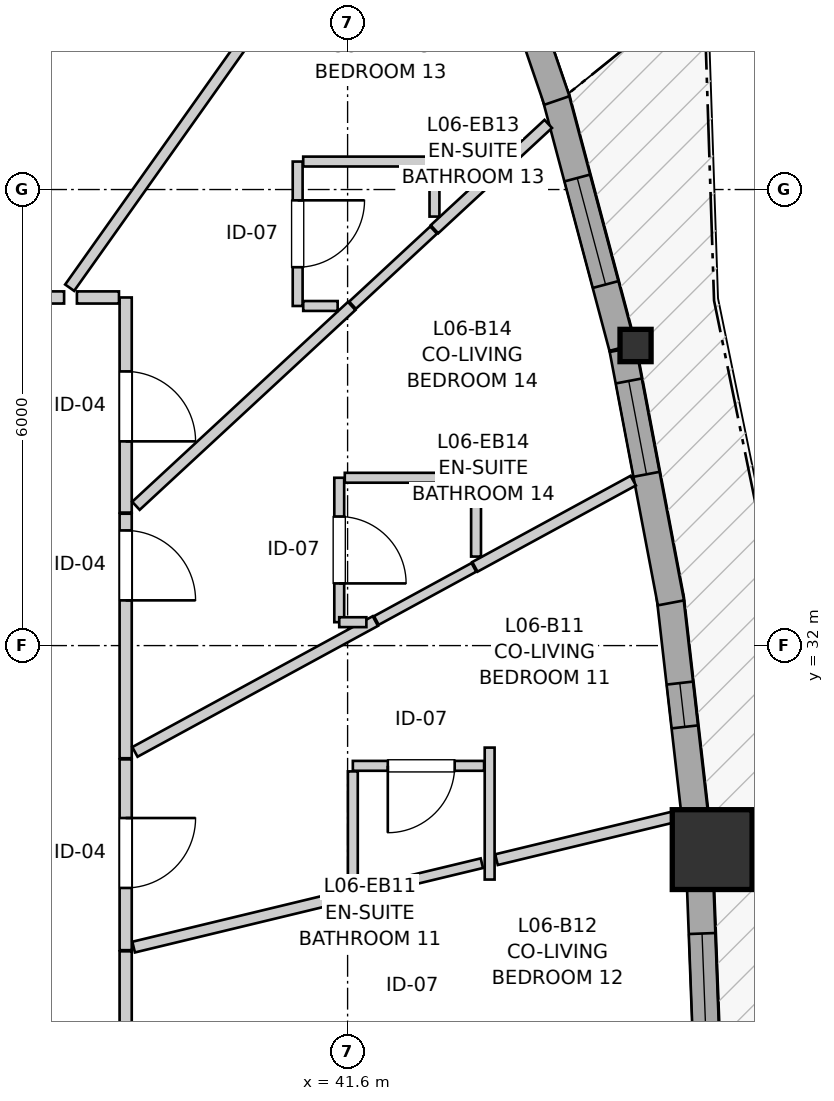
"""IFC4 building model, lengths in metres.
Left out: names, types, materials, properties, quantities, classifications, styles, units other than length and angle.
Written with IfcOpenShell. Run it as: python <this file> out.ifc"""

import sys

from ifc_helpers import new_model, si_unit, direction, frame, frame_2d, origin, origin_2d, place, context, subcontext, project, spatial, rectangle, i_section, extrude, source, transform, mapped, element, fill, save


model = new_model("IFC4")
c1 = context("Model", 3, precision=1e-05, world=origin(), true_north=direction((0.0, 1.0)))
c2 = subcontext(c1, "Body", "Model", "MODEL_VIEW")
j1 = project(units=[si_unit("LENGTHUNIT", "METRE"), si_unit("PLANEANGLEUNIT", "RADIAN")], contexts=[c1])
p1 = place(None, origin())
s1 = spatial("IfcSite", under=j1, at=p1, CompositionType="ELEMENT")
p2 = place(p1, origin())
s2 = spatial("IfcBuilding", under=s1, at=p2, CompositionType="ELEMENT")
p3 = place(p2, frame((0.0, 0.0, 23.8)))
s3 = spatial("IfcBuildingStorey", under=s2, at=p3, CompositionType="ELEMENT", Elevation=23.8)
m1 = source(origin(), c2, "Body", "SweptSolid", [
    extrude(rectangle(XDim=1.05, YDim=1.05, at=origin_2d()), origin(), (0.0, 0.0, 1.0), 2.935),
])
p4 = place(p3, frame((46.397, 29.316, 0.0), z_axis=(0.0, 0.0, 1.0), x_axis=(1.0, 0.0, 0.0)))
e1 = element("IfcColumn", 1, at=p4, inside=s3, PredefinedType="COLUMN", context=c2, shape_type="MappedRepresentation", body=[
    mapped(m1, transform((0.0, 0.0, 0.0), x_axis=(1.0, 0.0, 0.0), y_axis=(0.0, 1.0, 0.0), z_axis=(0.0, 0.0, 1.0), scale=1.0)),
])
m2 = source(origin(), c2, "Body", "SweptSolid", [
    extrude(i_section(OverallWidth=0.409, OverallDepth=0.425, WebThickness=0.03, FlangeThickness=0.048, FilletRadius=0.015, at=origin_2d()), origin(), (0.0, 0.0, 1.0), 2.935),
])
p5 = place(p3, frame((45.389, 35.948, 0.0), z_axis=(0.0, 0.0, 1.0), x_axis=(1.0, 0.0, 0.0)))
e2 = element("IfcColumn", 2, at=p5, inside=s3, PredefinedType="PILASTER", context=c2, shape_type="MappedRepresentation", body=[
    mapped(m2, transform((0.0, 0.0, 0.0), x_axis=(1.0, 0.0, 0.0), y_axis=(0.0, 1.0, 0.0), z_axis=(0.0, 0.0, 1.0), scale=1.0)),
])
p6 = place(p3, frame((46.349, 25.955, 0.0), z_axis=(0.0, 0.0, 1.0), x_axis=(-0.038022046735, 0.999276900545, 0.0)))
e3 = element("IfcWall", 3, at=p6, inside=s3, PredefinedType="SOLIDWALL", context=c2, shape_type="SweptSolid", body=[
    extrude(rectangle(XDim=3.056, YDim=0.35, at=frame_2d((1.528, 0.0))), origin(), (0.0, 0.0, 1.0), 2.415),
])
p7 = place(p6, frame((0.808, 0.0, 0.82)))
e4 = element("IfcOpeningElement", 4, at=p7, cuts=e3, PredefinedType="OPENING", context=c2, shape_type="SweptSolid", body=[
    extrude(rectangle(XDim=1.45, YDim=1.25, at=frame_2d((0.725, 0.625))), frame((0.0, 0.185, 0.0), z_axis=(0.0, -1.0, 0.0), x_axis=(1.0, 0.0, 0.0)), (0.0, 0.0, 1.0), 0.37),
])
p8 = place(p3, frame((46.189, 29.594, 0.0), z_axis=(0.0, 0.0, 1.0), x_axis=(-0.113201797404, 0.99357201705, 0.0)))
e5 = element("IfcWall", 5, at=p8, inside=s3, PredefinedType="SOLIDWALL", context=c2, shape_type="SweptSolid", body=[
    extrude(rectangle(XDim=3.075, YDim=0.35, at=frame_2d((1.538, 0.0))), origin(), (0.0, 0.0, 1.0), 2.415),
])
p9 = place(p8, frame((1.345, 0.0, 0.82)))
e6 = element("IfcOpeningElement", 6, at=p9, cuts=e5, PredefinedType="OPENING", context=c2, shape_type="SweptSolid", body=[
    extrude(rectangle(XDim=0.58, YDim=1.35, at=frame_2d((0.29, 0.675))), frame((0.0, 0.185, 0.0), z_axis=(0.0, -1.0, 0.0), x_axis=(1.0, 0.0, 0.0)), (0.0, 0.0, 1.0), 0.37),
])
p10 = place(p3, frame((45.854, 32.562, 0.0), z_axis=(0.0, 0.0, 1.0), x_axis=(-0.186698837055, 0.982417194598, 0.0)))
e7 = element("IfcWall", 7, at=p10, inside=s3, PredefinedType="SOLIDWALL", context=c2, shape_type="SweptSolid", body=[
    extrude(rectangle(XDim=3.393, YDim=0.35, at=frame_2d((1.697, 0.0))), origin(), (0.0, 0.0, 1.0), 2.415),
])
p11 = place(p10, frame((1.721, 0.0, 0.82)))
e8 = element("IfcOpeningElement", 8, at=p11, cuts=e7, PredefinedType="OPENING", context=c2, shape_type="SweptSolid", body=[
    extrude(rectangle(XDim=1.25, YDim=1.35, at=frame_2d((0.625, 0.675))), frame((0.0, 0.185, 0.0), z_axis=(0.0, -1.0, 0.0), x_axis=(1.0, 0.0, 0.0)), (0.0, 0.0, 1.0), 0.37),
])
p12 = place(p3, frame((45.214, 35.922, 0.0), z_axis=(0.0, 0.0, 1.0), x_axis=(-0.257081073508, 0.966389839373, 0.0)))
e9 = element("IfcWall", 9, at=p12, inside=s3, PredefinedType="SOLIDWALL", context=c2, shape_type="SweptSolid", body=[
    extrude(rectangle(XDim=3.449, YDim=0.35, at=frame_2d((1.725, 0.0))), origin(), (0.0, 0.0, 1.0), 2.415),
])
p13 = place(p12, frame((0.857, 0.0, 0.82)))
e10 = element("IfcOpeningElement", 10, at=p13, cuts=e9, PredefinedType="OPENING", context=c2, shape_type="SweptSolid", body=[
    extrude(rectangle(XDim=1.45, YDim=1.25, at=frame_2d((0.725, 0.625))), frame((0.0, 0.185, 0.0), z_axis=(0.0, -1.0, 0.0), x_axis=(1.0, 0.0, 0.0)), (0.0, 0.0, 1.0), 0.37),
])
p14 = place(p3, frame((44.353, 39.171, 0.0), z_axis=(0.0, 0.0, 1.0), x_axis=(-0.323604310653, 0.946192501623, 0.0)))
e11 = element("IfcWall", 11, at=p14, inside=s3, PredefinedType="SOLIDWALL", context=c2, shape_type="SweptSolid", body=[
    extrude(rectangle(XDim=3.243, YDim=0.35, at=frame_2d((1.621, 0.0))), origin(), (0.0, 0.0, 1.0), 2.415),
])
p15 = place(p14, frame((0.901, 0.0, 0.82)))
e12 = element("IfcOpeningElement", 12, at=p15, cuts=e11, PredefinedType="OPENING", context=c2, shape_type="SweptSolid", body=[
    extrude(rectangle(XDim=1.45, YDim=1.25, at=frame_2d((0.725, 0.625))), frame((0.0, 0.185, 0.0), z_axis=(0.0, -1.0, 0.0), x_axis=(1.0, 0.0, 0.0)), (0.0, 0.0, 1.0), 0.37),
])
p16 = place(p3, frame((38.68, 33.735, 0.0), z_axis=(0.0, 0.0, 1.0), x_axis=(0.0, -1.0, 0.0)))
e13 = element("IfcWall", 13, at=p16, inside=s3, PredefinedType="PARTITIONING", context=c2, shape_type="SweptSolid", body=[
    extrude(rectangle(XDim=3.217, YDim=0.16, at=frame_2d((1.608, 0.0))), origin(), (0.0, 0.0, 1.0), 2.935),
])
p17 = place(p16, frame((0.22, 0.0, 0.0)))
e14 = element("IfcOpeningElement", 14, at=p17, cuts=e13, PredefinedType="OPENING", context=c2, shape_type="SweptSolid", body=[
    extrude(rectangle(XDim=0.92, YDim=2.1, at=frame_2d((0.46, 1.05))), frame((0.0, 0.09, 0.0), z_axis=(0.0, -1.0, 0.0), x_axis=(1.0, 0.0, 0.0)), (0.0, 0.0, 1.0), 0.18),
])
p18 = place(p3, frame((38.68, 36.58, 0.0), z_axis=(0.0, 0.0, 1.0), x_axis=(0.0, -1.0, 0.0)))
e15 = element("IfcWall", 15, at=p18, inside=s3, PredefinedType="PARTITIONING", context=c2, shape_type="SweptSolid", body=[
    extrude(rectangle(XDim=2.83, YDim=0.16, at=frame_2d((1.415, 0.0))), origin(), (0.0, 0.0, 1.0), 2.935),
])
p19 = place(p18, frame((0.973, 0.0, 0.0)))
e16 = element("IfcOpeningElement", 16, at=p19, cuts=e15, PredefinedType="OPENING", context=c2, shape_type="SweptSolid", body=[
    extrude(rectangle(XDim=0.92, YDim=2.1, at=frame_2d((0.46, 1.05))), frame((0.0, 0.09, 0.0), z_axis=(0.0, -1.0, 0.0), x_axis=(1.0, 0.0, 0.0)), (0.0, 0.0, 1.0), 0.18),
])
p20 = place(p3, frame((38.68, 30.503, 0.0), z_axis=(0.0, 0.0, 1.0), x_axis=(0.0, -1.0, 0.0)))
e17 = element("IfcWall", 17, at=p20, inside=s3, PredefinedType="PARTITIONING", context=c2, shape_type="SweptSolid", body=[
    extrude(rectangle(XDim=2.51, YDim=0.16, at=frame_2d((1.255, 0.0))), origin(), (0.0, 0.0, 1.0), 2.935),
])
p21 = place(p20, frame((0.771, 0.0, 0.0)))
e18 = element("IfcOpeningElement", 18, at=p21, cuts=e17, PredefinedType="OPENING", context=c2, shape_type="SweptSolid", body=[
    extrude(rectangle(XDim=0.92, YDim=2.1, at=frame_2d((0.46, 1.05))), frame((0.0, 0.09, 0.0), z_axis=(0.0, -1.0, 0.0), x_axis=(1.0, 0.0, 0.0)), (0.0, 0.0, 1.0), 0.18),
])
p22 = place(p3, frame((38.68, 27.978, 0.0), z_axis=(0.0, 0.0, 1.0), x_axis=(0.0, -1.0, 0.0)))
e19 = element("IfcWall", 19, at=p22, inside=s3, PredefinedType="PARTITIONING", context=c2, shape_type="SweptSolid", body=[
    extrude(rectangle(XDim=2.321, YDim=0.16, at=frame_2d((1.161, 0.0))), origin(), (0.0, 0.0, 1.0), 2.935),
])
p23 = place(p22, frame((0.941, 0.0, 0.0)))
e20 = element("IfcOpeningElement", 20, at=p23, cuts=e19, PredefinedType="OPENING", context=c2, shape_type="SweptSolid", body=[
    extrude(rectangle(XDim=0.92, YDim=2.1, at=frame_2d((0.46, 1.05))), frame((0.0, 0.09, 0.0), z_axis=(0.0, -1.0, 0.0), x_axis=(1.0, 0.0, 0.0)), (0.0, 0.0, 1.0), 0.18),
])
p24 = place(p3, frame((35.773, 36.58, 0.0), z_axis=(0.0, 0.0, 1.0), x_axis=(1.0, 0.0, 0.0)))
e21 = element("IfcWall", 21, at=p24, inside=s3, PredefinedType="PARTITIONING", context=c2, shape_type="SweptSolid", body=[
    extrude(rectangle(XDim=2.097, YDim=0.16, at=frame_2d((1.049, 0.0))), origin(), (0.0, 0.0, 1.0), 2.935),
])
p25 = place(p24, frame((0.588, 0.0, 0.0)))
e22 = element("IfcOpeningElement", 22, at=p25, cuts=e21, PredefinedType="OPENING", context=c2, shape_type="SweptSolid", body=[
    extrude(rectangle(XDim=0.92, YDim=2.1, at=frame_2d((0.46, 1.05))), frame((0.0, 0.09, 0.0), z_axis=(0.0, -1.0, 0.0), x_axis=(1.0, 0.0, 0.0)), (0.0, 0.0, 1.0), 0.18),
])
p26 = place(p3, frame((40.943, 38.368, 0.0), z_axis=(0.0, 0.0, 1.0), x_axis=(0.0, -1.0, 0.0)))
e23 = element("IfcWall", 23, at=p26, inside=s3, PredefinedType="PARTITIONING", context=c2, shape_type="SweptSolid", body=[
    extrude(rectangle(XDim=1.9, YDim=0.13, at=frame_2d((0.95, 0.0))), origin(), (0.0, 0.0, 1.0), 2.935),
])
p27 = place(p26, frame((0.51, 0.0, 0.0)))
e24 = element("IfcOpeningElement", 24, at=p27, cuts=e23, PredefinedType="OPENING", context=c2, shape_type="SweptSolid", body=[
    extrude(rectangle(XDim=0.88, YDim=2.05, at=frame_2d((0.44, 1.025))), frame((0.0, 0.075, 0.0), z_axis=(0.0, -1.0, 0.0), x_axis=(1.0, 0.0, 0.0)), (0.0, 0.0, 1.0), 0.15),
])
p28 = place(p3, frame((41.49, 34.208, 0.0), z_axis=(0.0, 0.0, 1.0), x_axis=(0.0, -1.0, 0.0)))
e25 = element("IfcWall", 25, at=p28, inside=s3, PredefinedType="PARTITIONING", context=c2, shape_type="SweptSolid", body=[
    extrude(rectangle(XDim=1.9, YDim=0.13, at=frame_2d((0.95, 0.0))), origin(), (0.0, 0.0, 1.0), 2.935),
])
p29 = place(p28, frame((0.51, 0.0, 0.0)))
e26 = element("IfcOpeningElement", 26, at=p29, cuts=e25, PredefinedType="OPENING", context=c2, shape_type="SweptSolid", body=[
    extrude(rectangle(XDim=0.88, YDim=2.05, at=frame_2d((0.44, 1.025))), frame((0.0, 0.075, 0.0), z_axis=(0.0, -1.0, 0.0), x_axis=(1.0, 0.0, 0.0)), (0.0, 0.0, 1.0), 0.15),
])
p30 = place(p3, frame((43.396, 30.418, 0.0), z_axis=(0.0, 0.0, 1.0), x_axis=(-1.0, 0.0, 0.0)))
e27 = element("IfcWall", 27, at=p30, inside=s3, PredefinedType="PARTITIONING", context=c2, shape_type="SweptSolid", body=[
    extrude(rectangle(XDim=1.727, YDim=0.13, at=frame_2d((0.864, 0.0))), origin(), (0.0, 0.0, 1.0), 2.935),
])
p31 = place(p30, frame((0.387, 0.0, 0.0)))
e28 = element("IfcOpeningElement", 28, at=p31, cuts=e27, PredefinedType="OPENING", context=c2, shape_type="SweptSolid", body=[
    extrude(rectangle(XDim=0.88, YDim=2.05, at=frame_2d((0.44, 1.025))), frame((0.0, 0.075, 0.0), z_axis=(0.0, -1.0, 0.0), x_axis=(1.0, 0.0, 0.0)), (0.0, 0.0, 1.0), 0.15),
])
p32 = place(p3, frame((34.219, 36.692, 0.0), z_axis=(0.0, 0.0, 1.0), x_axis=(0.340186046968, 0.940358151689, 0.0)))
e29 = element("IfcWall", 29, at=p32, inside=s3, PredefinedType="PARTITIONING", context=c2, shape_type="SweptSolid", body=[
    extrude(rectangle(XDim=11.951, YDim=0.145, at=frame_2d((5.976, 0.0))), origin(), (0.0, 0.0, 1.0), 2.935),
])
p33 = place(p3, frame((35.852, 36.7, 0.0), z_axis=(0.0, 0.0, 1.0), x_axis=(0.457258091214, 0.889334041865, 0.0)))
e30 = element("IfcWall", 30, at=p33, inside=s3, PredefinedType="PARTITIONING", context=c2, shape_type="SweptSolid", body=[
    extrude(rectangle(XDim=11.227, YDim=0.145, at=frame_2d((5.613, 0.0))), origin(), (0.0, 0.0, 1.0), 2.935),
])
p34 = place(p3, frame((37.943, 36.708, 0.0), z_axis=(0.0, 0.0, 1.0), x_axis=(0.578429476704, 0.81573239514, 0.0)))
e31 = element("IfcWall", 31, at=p34, inside=s3, PredefinedType="PARTITIONING", context=c2, shape_type="SweptSolid", body=[
    extrude(rectangle(XDim=8.447, YDim=0.145, at=frame_2d((4.223, 0.0))), origin(), (0.0, 0.0, 1.0), 2.935),
])
p35 = place(p3, frame((38.815, 33.839, 0.0), z_axis=(0.0, 0.0, 1.0), x_axis=(0.733718730688, 0.67945332749, 0.0)))
e32 = element("IfcWall", 32, at=p35, inside=s3, PredefinedType="PARTITIONING", context=c2, shape_type="SweptSolid", body=[
    extrude(rectangle(XDim=3.869, YDim=0.145, at=frame_2d((1.935, 0.0))), origin(), (0.0, 0.0, 1.0), 2.935),
])
p36 = place(p3, frame((38.802, 30.601, 0.0), z_axis=(0.0, 0.0, 1.0), x_axis=(0.878335610987, 0.478044510973, 0.0)))
e33 = element("IfcWall", 33, at=p36, inside=s3, PredefinedType="PARTITIONING", context=c2, shape_type="SweptSolid", body=[
    extrude(rectangle(XDim=3.602, YDim=0.145, at=frame_2d((1.801, 0.0))), origin(), (0.0, 0.0, 1.0), 2.103),
])
p37 = place(p3, frame((38.785, 28.033, 0.0), z_axis=(0.0, 0.0, 1.0), x_axis=(0.972108739033, 0.234530593943, 0.0)))
e34 = element("IfcWall", 34, at=p37, inside=s3, PredefinedType="PARTITIONING", context=c2, shape_type="SweptSolid", body=[
    extrude(rectangle(XDim=2.967, YDim=0.145, at=frame_2d((1.483, 0.0))), origin(), (0.0, 0.0, 1.0), 2.935),
])
p38 = place(p3, frame((43.559, 29.184, 0.0), z_axis=(0.0, 0.0, 1.0), x_axis=(0.972124665715, 0.23446456941, 0.0)))
e35 = element("IfcWall", 35, at=p38, inside=s3, PredefinedType="PARTITIONING", context=c2, shape_type="SweptSolid", body=[
    extrude(rectangle(XDim=2.487, YDim=0.145, at=frame_2d((1.243, 0.0))), origin(), (0.0, 0.0, 1.0), 2.935),
])
p39 = place(p3, frame((43.275, 33.036, 0.0), z_axis=(0.0, 0.0, 1.0), x_axis=(0.878237509553, 0.478224713721, 0.0)))
e36 = element("IfcWall", 36, at=p39, inside=s3, PredefinedType="PARTITIONING", context=c2, shape_type="SweptSolid", body=[
    extrude(rectangle(XDim=2.372, YDim=0.145, at=frame_2d((1.186, 0.0))), origin(), (0.0, 0.0, 1.0), 2.935),
])
p40 = place(p3, frame((42.743, 37.477, 0.0), z_axis=(0.0, 0.0, 1.0), x_axis=(0.73374741774, 0.679422347999, 0.0)))
e37 = element("IfcWall", 37, at=p40, inside=s3, PredefinedType="PARTITIONING", context=c2, shape_type="SweptSolid", body=[
    extrude(rectangle(XDim=2.04, YDim=0.145, at=frame_2d((1.02, 0.0))), origin(), (0.0, 0.0, 1.0), 2.935),
])
p41 = place(p3, frame((41.684, 28.732, 0.0), z_axis=(0.0, 0.0, 1.0), x_axis=(0.972269386076, 0.233863722924, 0.0)))
e38 = element("IfcWall", 38, at=p41, inside=s3, PredefinedType="PARTITIONING", context=c2, shape_type="SweptSolid", body=[
    extrude(rectangle(XDim=1.731, YDim=0.13, at=frame_2d((0.865, 0.0))), origin(), (0.0, 0.0, 1.0), 2.935),
])
p42 = place(p3, frame((41.016, 38.368, 0.0), z_axis=(0.0, 0.0, 1.0), x_axis=(1.0, 0.0, 0.0)))
e39 = element("IfcWall", 39, at=p42, inside=s3, PredefinedType="PARTITIONING", context=c2, shape_type="SweptSolid", body=[
    extrude(rectangle(XDim=1.727, YDim=0.13, at=frame_2d((0.863, 0.0))), origin(), (0.0, 0.0, 1.0), 2.935),
])
p43 = place(p3, frame((41.563, 34.208, 0.0), z_axis=(0.0, 0.0, 1.0), x_axis=(1.0, 0.0, 0.0)))
e40 = element("IfcWall", 40, at=p43, inside=s3, PredefinedType="PARTITIONING", context=c2, shape_type="SweptSolid", body=[
    extrude(rectangle(XDim=1.727, YDim=0.13, at=frame_2d((0.864, 0.0))), origin(), (0.0, 0.0, 1.0), 2.935),
])
p44 = place(p3, frame((41.669, 28.827, 0.0), z_axis=(0.0, 0.0, 1.0), x_axis=(0.0, 1.0, 0.0)))
e41 = element("IfcWall", 41, at=p44, inside=s3, PredefinedType="PARTITIONING", context=c2, shape_type="SweptSolid", body=[
    extrude(rectangle(XDim=1.518, YDim=0.13, at=frame_2d((0.759, 0.0))), origin(), (0.0, 0.0, 1.0), 2.935),
])
p45 = place(p3, frame((41.978, 32.33, 0.0), z_axis=(0.0, 0.0, 1.0), x_axis=(0.878138043068, 0.478407334097, 0.0)))
e42 = element("IfcWall", 42, at=p45, inside=s3, PredefinedType="PARTITIONING", context=c2, shape_type="SweptSolid", body=[
    extrude(rectangle(XDim=1.462, YDim=0.13, at=frame_2d((0.731, 0.0))), origin(), (0.0, 0.0, 1.0), 2.935),
])
p46 = place(p3, frame((41.665, 36.478, 0.0), z_axis=(0.0, 0.0, 1.0), x_axis=(0.733534386117, 0.679652340821, 0.0)))
e43 = element("IfcWall", 43, at=p46, inside=s3, PredefinedType="PARTITIONING", context=c2, shape_type="SweptSolid", body=[
    extrude(rectangle(XDim=1.454, YDim=0.13, at=frame_2d((0.727, 0.0))), origin(), (0.0, 0.0, 1.0), 2.935),
])
p47 = place(p3, frame((43.469, 28.922, 0.0), z_axis=(0.0, 0.0, 1.0), x_axis=(0.0, 1.0, 0.0)))
e44 = element("IfcWall", 44, at=p47, inside=s3, PredefinedType="PARTITIONING", context=c2, shape_type="SweptSolid", body=[
    extrude(rectangle(XDim=1.736, YDim=0.13, at=frame_2d((0.868, 0.0))), origin(), (0.0, 0.0, 1.0), 2.935),
])
p48 = place(p3, frame((43.29, 33.171, 0.0), z_axis=(0.0, 0.0, 1.0), x_axis=(0.0, 1.0, 0.0)))
e45 = element("IfcWall", 45, at=p48, inside=s3, PredefinedType="PARTITIONING", context=c2, shape_type="SweptSolid", body=[
    extrude(rectangle(XDim=0.964, YDim=0.13, at=frame_2d((0.482, 0.0))), origin(), (0.0, 0.0, 1.0), 2.935),
])
p49 = place(p3, frame((42.743, 37.644, 0.0), z_axis=(0.0, 0.0, 1.0), x_axis=(0.0, 1.0, 0.0)))
e46 = element("IfcWall", 46, at=p49, inside=s3, PredefinedType="PARTITIONING", context=c2, shape_type="SweptSolid", body=[
    extrude(rectangle(XDim=0.651, YDim=0.13, at=frame_2d((0.325, 0.0))), origin(), (0.0, 0.0, 1.0), 2.935),
])
p50 = place(p3, frame((38.039, 36.58, 0.0), z_axis=(0.0, 0.0, 1.0), x_axis=(1.0, 0.0, 0.0)))
e47 = element("IfcWall", 47, at=p50, inside=s3, PredefinedType="PARTITIONING", context=c2, shape_type="SweptSolid", body=[
    extrude(rectangle(XDim=0.553, YDim=0.16, at=frame_2d((0.277, 0.0))), origin(), (0.0, 0.0, 1.0), 2.935),
])
p51 = place(p3, frame((41.016, 36.468, 0.0), z_axis=(0.0, 0.0, 1.0), x_axis=(1.0, 0.0, 0.0)))
e48 = element("IfcWall", 48, at=p51, inside=s3, PredefinedType="PARTITIONING", context=c2, shape_type="SweptSolid", body=[
    extrude(rectangle(XDim=0.453, YDim=0.13, at=frame_2d((0.227, 0.0))), origin(), (0.0, 0.0, 1.0), 2.935),
])
p52 = place(p3, frame((41.49, 32.308, 0.0), z_axis=(0.0, 0.0, 1.0), x_axis=(1.0, 0.0, 0.0)))
e49 = element("IfcWall", 49, at=p52, inside=s3, PredefinedType="PARTITIONING", context=c2, shape_type="SweptSolid", body=[
    extrude(rectangle(XDim=0.357, YDim=0.13, at=frame_2d((0.178, 0.0))), origin(), (0.0, 0.0, 1.0), 2.935),
])
m3 = source(origin(), c2, "Body", "SweptSolid", [
    extrude(rectangle(XDim=1.45, YDim=1.25, at=frame_2d((0.725, 0.625))), frame((0.0, 0.03, 0.0), z_axis=(0.0, -1.0, 0.0), x_axis=(1.0, 0.0, 0.0)), (0.0, 0.0, 1.0), 0.06),
])
p53 = place(p7, origin())
e50 = element("IfcWindow", 50, at=p53, inside=s3, PartitioningType="SINGLE_PANEL", PredefinedType="WINDOW", context=c2, shape_type="MappedRepresentation", body=[
    mapped(m3, transform((0.0, 0.0, 0.0), x_axis=(1.0, 0.0, 0.0), y_axis=(0.0, 1.0, 0.0), z_axis=(0.0, 0.0, 1.0), scale=1.0)),
])
fill(e4, e50)
m4 = source(origin(), c2, "Body", "SweptSolid", [
    extrude(rectangle(XDim=1.25, YDim=1.35, at=frame_2d((0.625, 0.675))), frame((0.0, 0.03, 0.0), z_axis=(0.0, -1.0, 0.0), x_axis=(1.0, 0.0, 0.0)), (0.0, 0.0, 1.0), 0.06),
])
p54 = place(p11, origin())
e51 = element("IfcWindow", 51, at=p54, inside=s3, PartitioningType="SINGLE_PANEL", PredefinedType="WINDOW", context=c2, shape_type="MappedRepresentation", body=[
    mapped(m4, transform((0.0, 0.0, 0.0), x_axis=(1.0, 0.0, 0.0), y_axis=(0.0, 1.0, 0.0), z_axis=(0.0, 0.0, 1.0), scale=1.0)),
])
fill(e8, e51)
p55 = place(p13, origin())
e52 = element("IfcWindow", 52, at=p55, inside=s3, PartitioningType="SINGLE_PANEL", PredefinedType="WINDOW", context=c2, shape_type="MappedRepresentation", body=[
    mapped(m3, transform((0.0, 0.0, 0.0), x_axis=(1.0, 0.0, 0.0), y_axis=(0.0, 1.0, 0.0), z_axis=(0.0, 0.0, 1.0), scale=1.0)),
])
fill(e10, e52)
m5 = source(origin(), c2, "Body", "SweptSolid", [
    extrude(rectangle(XDim=0.58, YDim=1.35, at=frame_2d((0.29, 0.675))), frame((0.0, 0.03, 0.0), z_axis=(0.0, -1.0, 0.0), x_axis=(1.0, 0.0, 0.0)), (0.0, 0.0, 1.0), 0.06),
])
p56 = place(p9, origin())
e53 = element("IfcWindow", 53, at=p56, inside=s3, PartitioningType="SINGLE_PANEL", PredefinedType="WINDOW", context=c2, shape_type="MappedRepresentation", body=[
    mapped(m5, transform((0.0, 0.0, 0.0), x_axis=(1.0, 0.0, 0.0), y_axis=(0.0, 1.0, 0.0), z_axis=(0.0, 0.0, 1.0), scale=1.0)),
])
fill(e6, e53)
m6 = source(origin(), c2, "Body", "SweptSolid", [
    extrude(rectangle(XDim=0.92, YDim=2.1, at=frame_2d((0.46, 1.05))), frame((0.0, 0.025, 0.0), z_axis=(0.0, -1.0, 0.0), x_axis=(1.0, 0.0, 0.0)), (0.0, 0.0, 1.0), 0.05),
])
p57 = place(p17, origin())
e54 = element("IfcDoor", 54, at=p57, inside=s3, OperationType="SINGLE_SWING_RIGHT", PredefinedType="DOOR", context=c2, shape_type="MappedRepresentation", body=[
    mapped(m6, transform((0.0, 0.0, 0.0), x_axis=(1.0, 0.0, 0.0), y_axis=(0.0, 1.0, 0.0), z_axis=(0.0, 0.0, 1.0), scale=1.0)),
])
fill(e14, e54)
p58 = place(p19, origin())
e55 = element("IfcDoor", 55, at=p58, inside=s3, OperationType="SINGLE_SWING_RIGHT", PredefinedType="DOOR", context=c2, shape_type="MappedRepresentation", body=[
    mapped(m6, transform((0.0, 0.0, 0.0), x_axis=(1.0, 0.0, 0.0), y_axis=(0.0, 1.0, 0.0), z_axis=(0.0, 0.0, 1.0), scale=1.0)),
])
fill(e16, e55)
p59 = place(p21, origin())
e56 = element("IfcDoor", 56, at=p59, inside=s3, OperationType="SINGLE_SWING_LEFT", PredefinedType="DOOR", context=c2, shape_type="MappedRepresentation", body=[
    mapped(m6, transform((0.0, 0.0, 0.0), x_axis=(1.0, 0.0, 0.0), y_axis=(0.0, 1.0, 0.0), z_axis=(0.0, 0.0, 1.0), scale=1.0)),
])
fill(e18, e56)
m7 = source(origin(), c2, "Body", "SweptSolid", [
    extrude(rectangle(XDim=0.88, YDim=2.05, at=frame_2d((0.44, 1.025))), frame((0.0, 0.025, 0.0), z_axis=(0.0, -1.0, 0.0), x_axis=(1.0, 0.0, 0.0)), (0.0, 0.0, 1.0), 0.05),
])
p60 = place(p27, origin())
e57 = element("IfcDoor", 57, at=p60, inside=s3, OperationType="SINGLE_SWING_LEFT", PredefinedType="DOOR", context=c2, shape_type="MappedRepresentation", body=[
    mapped(m7, transform((0.0, 0.0, 0.0), x_axis=(1.0, 0.0, 0.0), y_axis=(0.0, 1.0, 0.0), z_axis=(0.0, 0.0, 1.0), scale=1.0)),
])
fill(e24, e57)
p61 = place(p29, origin())
e58 = element("IfcDoor", 58, at=p61, inside=s3, OperationType="SINGLE_SWING_RIGHT", PredefinedType="DOOR", context=c2, shape_type="MappedRepresentation", body=[
    mapped(m7, transform((0.0, 0.0, 0.0), x_axis=(1.0, 0.0, 0.0), y_axis=(0.0, 1.0, 0.0), z_axis=(0.0, 0.0, 1.0), scale=1.0)),
])
fill(e26, e58)
p62 = place(p31, origin())
e59 = element("IfcDoor", 59, at=p62, inside=s3, OperationType="SINGLE_SWING_RIGHT", PredefinedType="DOOR", context=c2, shape_type="MappedRepresentation", body=[
    mapped(m7, transform((0.0, 0.0, 0.0), x_axis=(1.0, 0.0, 0.0), y_axis=(0.0, 1.0, 0.0), z_axis=(0.0, 0.0, 1.0), scale=1.0)),
])
fill(e28, e59)
save(model, sys.argv[1])
